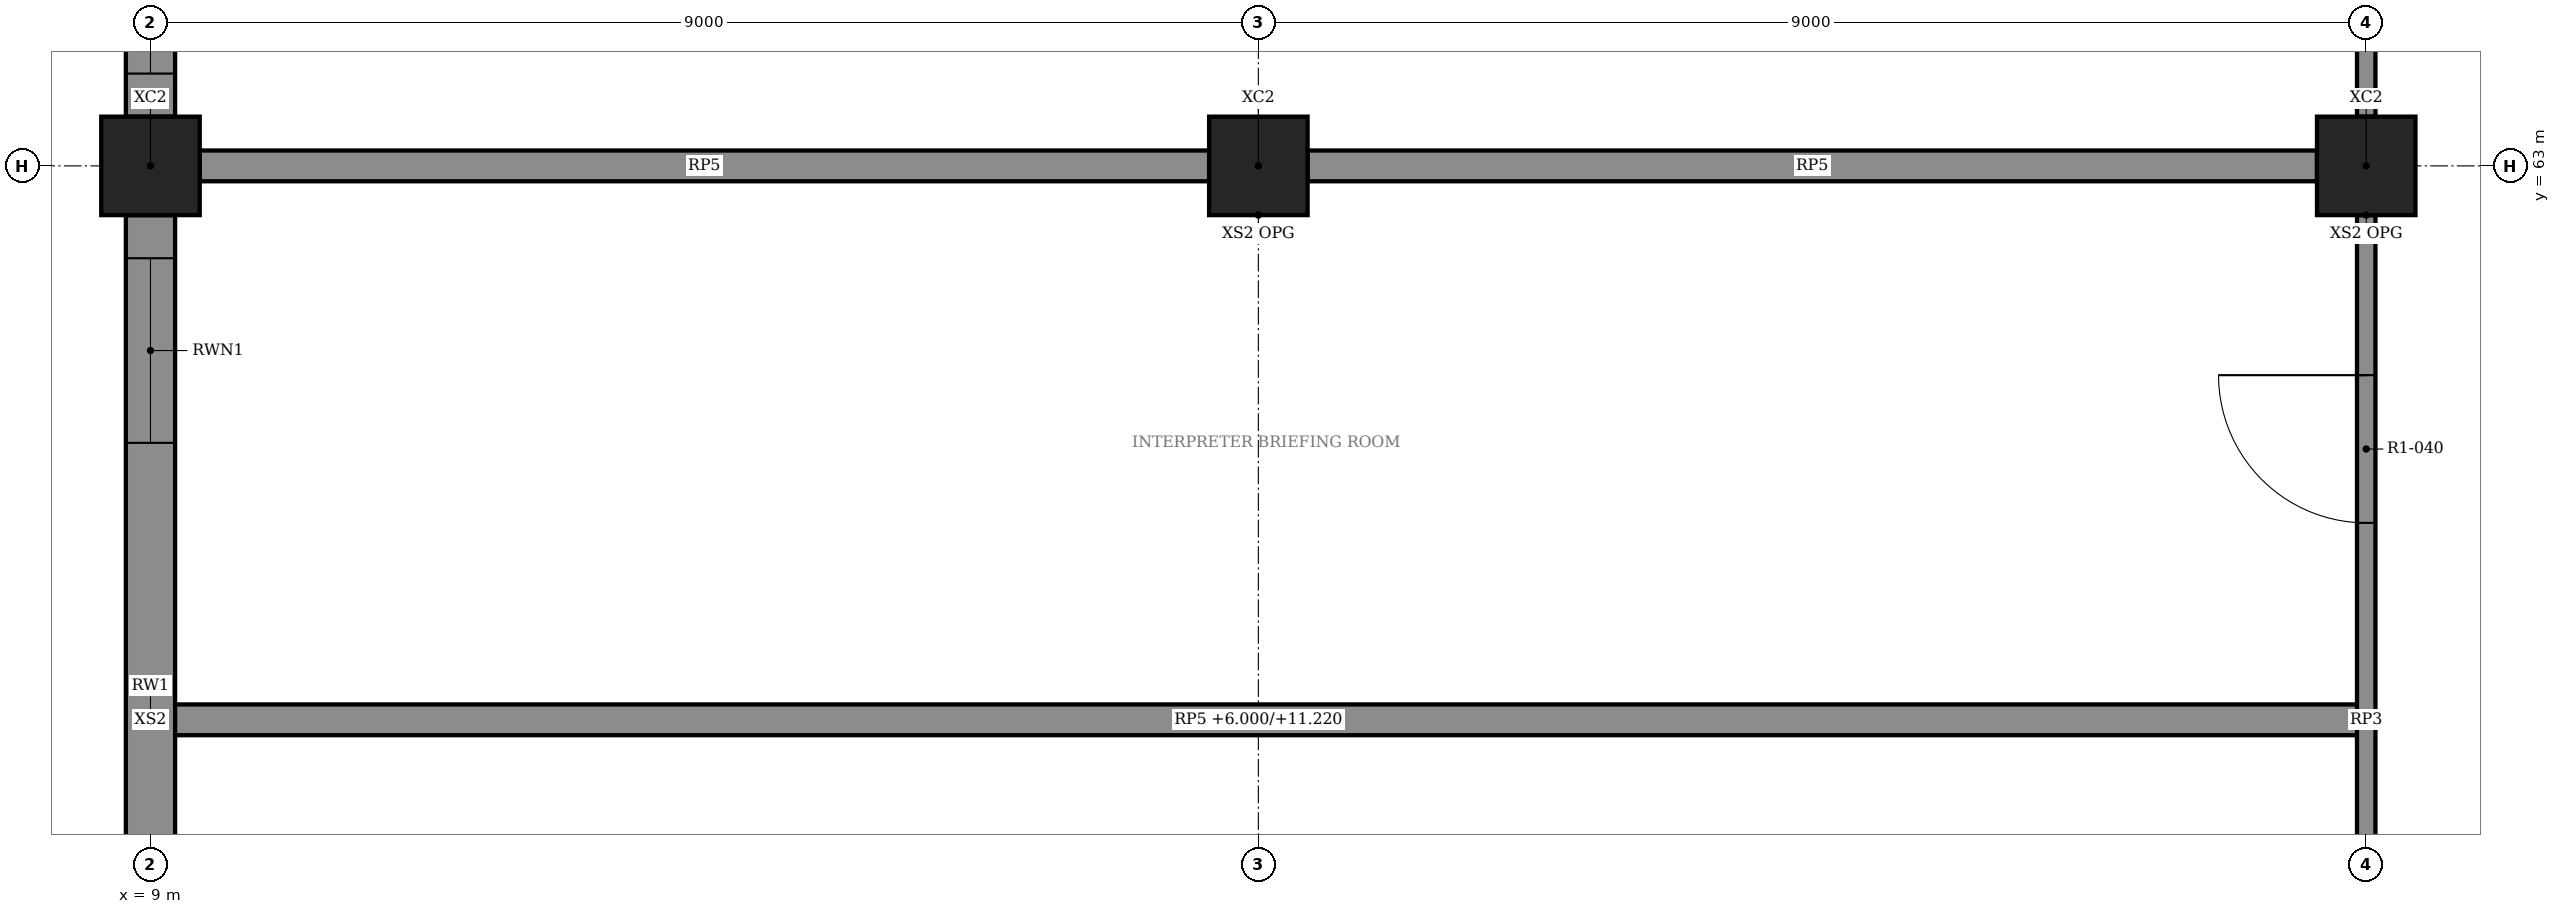
"""IFC4 building model, lengths in metres.
Left out: names, types, materials, properties, quantities, classifications, styles, units other than length and angle.
Written with IfcOpenShell. Run it as: python <this file> out.ifc"""

import sys

from ifc_helpers import new_model, si_unit, direction, frame, frame_2d, origin, origin_2d, place, context, subcontext, project, spatial, rectangle, extrude, element, fill, save


model = new_model("IFC4")
c1 = context("Model", 3, precision=1e-05, world=origin(), true_north=direction((0.0, 1.0)))
c2 = subcontext(c1, "Body", "Model", "MODEL_VIEW")
j1 = project(units=[si_unit("LENGTHUNIT", "METRE"), si_unit("PLANEANGLEUNIT", "RADIAN")], contexts=[c1])
p1 = place(None, origin())
s1 = spatial("IfcSite", under=j1, at=p1, CompositionType="ELEMENT")
p2 = place(p1, origin())
s2 = spatial("IfcBuilding", under=s1, at=p2, CompositionType="ELEMENT")
p3 = place(p2, frame((0.0, 0.0, 6.0)))
s3 = spatial("IfcBuildingStorey", under=s2, at=p3, CompositionType="ELEMENT", Elevation=6.0)
for number, where, z_axis, x_axis in (
    (1, (9.0, 63.0, 0.0), (0.0, 0.0, 1.0), (1.0, 0.0, 0.0)),
    (2, (18.0, 63.0, 0.0), (0.0, 0.0, 1.0), (1.0, 0.0, 0.0)),
    (3, (27.0, 63.0, 0.0), (0.0, 0.0, 1.0), (1.0, 0.0, 0.0)),
):
    element("IfcColumn", number, at=place(p3, frame(where, z_axis=z_axis, x_axis=x_axis)), inside=s3, PredefinedType="COLUMN", context=c2, shape_type="SweptSolid", body=[
        extrude(rectangle(XDim=0.8, YDim=0.8, at=origin_2d()), origin(), (0.0, 0.0, 1.0), 5.5),
    ])
p4 = place(p3, frame((9.0, 54.4, 0.0), z_axis=(0.0, 0.0, 1.0), x_axis=(0.0, 1.0, 0.0)))
e4 = element("IfcWall", 4, at=p4, inside=s3, PredefinedType="SOLIDWALL", context=c2, shape_type="SweptSolid", body=[
    extrude(rectangle(XDim=8.2, YDim=0.4, at=frame_2d((4.1, 0.0))), origin(), (0.0, 0.0, 1.0), 4.32),
])
p5 = place(p4, frame((0.35, 0.0, 0.9)))
e5 = element("IfcOpeningElement", 5, at=p5, cuts=e4, PredefinedType="OPENING", context=c2, shape_type="SweptSolid", body=[
    extrude(rectangle(XDim=1.5, YDim=2.1, at=frame_2d((0.75, 1.05))), frame((0.0, 0.21, 0.0), z_axis=(0.0, -1.0, 0.0), x_axis=(1.0, 0.0, 0.0)), (0.0, 0.0, 1.0), 0.42),
])
p6 = place(p4, frame((6.35, 0.0, 0.9)))
e6 = element("IfcOpeningElement", 6, at=p6, cuts=e4, PredefinedType="OPENING", context=c2, shape_type="SweptSolid", body=[
    extrude(rectangle(XDim=1.5, YDim=2.1, at=frame_2d((0.75, 1.05))), frame((0.0, 0.21, 0.0), z_axis=(0.0, -1.0, 0.0), x_axis=(1.0, 0.0, 0.0)), (0.0, 0.0, 1.0), 0.42),
])
p7 = place(p3, frame((9.0, 63.4, 0.0), z_axis=(0.0, 0.0, 1.0), x_axis=(0.0, 1.0, 0.0)))
e7 = element("IfcWall", 7, at=p7, inside=s3, PredefinedType="SOLIDWALL", context=c2, shape_type="SweptSolid", body=[
    extrude(rectangle(XDim=8.2, YDim=0.4, at=frame_2d((4.1, 0.0))), origin(), (0.0, 0.0, 1.0), 4.32),
])
p8 = place(p7, frame((0.35, 0.0, 0.9)))
e8 = element("IfcOpeningElement", 8, at=p8, cuts=e7, PredefinedType="OPENING", context=c2, shape_type="SweptSolid", body=[
    extrude(rectangle(XDim=1.5, YDim=2.1, at=frame_2d((0.75, 1.05))), frame((0.0, 0.21, 0.0), z_axis=(0.0, -1.0, 0.0), x_axis=(1.0, 0.0, 0.0)), (0.0, 0.0, 1.0), 0.42),
])
p9 = place(p7, frame((3.35, 0.0, 0.9)))
e9 = element("IfcOpeningElement", 9, at=p9, cuts=e7, PredefinedType="OPENING", context=c2, shape_type="SweptSolid", body=[
    extrude(rectangle(XDim=1.5, YDim=2.1, at=frame_2d((0.75, 1.05))), frame((0.0, 0.21, 0.0), z_axis=(0.0, -1.0, 0.0), x_axis=(1.0, 0.0, 0.0)), (0.0, 0.0, 1.0), 0.42),
])
p10 = place(p7, frame((6.35, 0.0, 0.9)))
e10 = element("IfcOpeningElement", 10, at=p10, cuts=e7, PredefinedType="OPENING", context=c2, shape_type="SweptSolid", body=[
    extrude(rectangle(XDim=1.5, YDim=2.1, at=frame_2d((0.75, 1.05))), frame((0.0, 0.21, 0.0), z_axis=(0.0, -1.0, 0.0), x_axis=(1.0, 0.0, 0.0)), (0.0, 0.0, 1.0), 0.42),
])
p11 = place(p3, frame((9.0, 58.5, 0.0), z_axis=(0.0, 0.0, 1.0), x_axis=(1.0, 0.0, 0.0)))
e11 = element("IfcWall", 11, at=p11, inside=s3, PredefinedType="PARTITIONING", context=c2, shape_type="SweptSolid", body=[
    extrude(rectangle(XDim=18.0, YDim=0.25, at=frame_2d((9.0, 0.0))), origin(), (0.0, 0.0, 1.0), 5.22),
])
for number, where, z_axis, x_axis in (
    (12, (9.4, 63.0, 0.0), (0.0, 0.0, 1.0), (1.0, 0.0, 0.0)),
    (13, (18.4, 63.0, 0.0), (0.0, 0.0, 1.0), (1.0, 0.0, 0.0)),
):
    element("IfcWall", number, at=place(p3, frame(where, z_axis=z_axis, x_axis=x_axis)), inside=s3, PredefinedType="PARTITIONING", context=c2, shape_type="SweptSolid", body=[
        extrude(rectangle(XDim=8.2, YDim=0.25, at=frame_2d((4.1, 0.0))), origin(), (0.0, 0.0, 1.0), 4.32),
    ])
p12 = place(p3, frame((27.0, 54.4, 0.0), z_axis=(0.0, 0.0, 1.0), x_axis=(0.0, 1.0, 0.0)))
e14 = element("IfcWall", 14, at=p12, inside=s3, PredefinedType="PARTITIONING", context=c2, shape_type="SweptSolid", body=[
    extrude(rectangle(XDim=8.2, YDim=0.15, at=frame_2d((4.1, 0.0))), origin(), (0.0, 0.0, 1.0), 4.32),
])
p13 = place(p12, frame((1.2, 0.0, 0.0)))
e15 = element("IfcOpeningElement", 15, at=p13, cuts=e14, PredefinedType="OPENING", context=c2, shape_type="SweptSolid", body=[
    extrude(rectangle(XDim=1.2, YDim=2.4, at=frame_2d((0.6, 1.2))), frame((0.0, 0.085, 0.0), z_axis=(0.0, -1.0, 0.0), x_axis=(1.0, 0.0, 0.0)), (0.0, 0.0, 1.0), 0.17),
])
p14 = place(p12, frame((5.7, 0.0, 0.0)))
e16 = element("IfcOpeningElement", 16, at=p14, cuts=e14, PredefinedType="OPENING", context=c2, shape_type="SweptSolid", body=[
    extrude(rectangle(XDim=1.2, YDim=2.4, at=frame_2d((0.6, 1.2))), frame((0.0, 0.085, 0.0), z_axis=(0.0, -1.0, 0.0), x_axis=(1.0, 0.0, 0.0)), (0.0, 0.0, 1.0), 0.17),
])
p15 = place(p3, frame((27.0, 63.4, 0.0), z_axis=(0.0, 0.0, 1.0), x_axis=(0.0, 1.0, 0.0)))
e17 = element("IfcWall", 17, at=p15, inside=s3, PredefinedType="PARTITIONING", context=c2, shape_type="SweptSolid", body=[
    extrude(rectangle(XDim=8.2, YDim=0.15, at=frame_2d((4.1, 0.0))), origin(), (0.0, 0.0, 1.0), 4.32),
])
p16 = place(p15, frame((3.45, 0.0, 0.0)))
e18 = element("IfcOpeningElement", 18, at=p16, cuts=e17, PredefinedType="OPENING", context=c2, shape_type="SweptSolid", body=[
    extrude(rectangle(XDim=1.2, YDim=2.4, at=frame_2d((0.6, 1.2))), frame((0.0, 0.085, 0.0), z_axis=(0.0, -1.0, 0.0), x_axis=(1.0, 0.0, 0.0)), (0.0, 0.0, 1.0), 0.17),
])
p17 = place(p6, origin())
e19 = element("IfcWindow", 19, at=p17, inside=s3, PartitioningType="SINGLE_PANEL", PredefinedType="WINDOW", context=c2, shape_type="SweptSolid", body=[
    extrude(rectangle(XDim=1.5, YDim=2.1, at=frame_2d((0.75, 1.05))), frame((0.0, 0.03, 0.0), z_axis=(0.0, -1.0, 0.0), x_axis=(1.0, 0.0, 0.0)), (0.0, 0.0, 1.0), 0.06),
])
fill(e6, e19)
p18 = place(p8, origin())
e20 = element("IfcWindow", 20, at=p18, inside=s3, PartitioningType="SINGLE_PANEL", PredefinedType="WINDOW", context=c2, shape_type="SweptSolid", body=[
    extrude(rectangle(XDim=1.5, YDim=2.1, at=frame_2d((0.75, 1.05))), frame((0.0, 0.03, 0.0), z_axis=(0.0, -1.0, 0.0), x_axis=(1.0, 0.0, 0.0)), (0.0, 0.0, 1.0), 0.06),
])
fill(e8, e20)
p19 = place(p14, origin())
e21 = element("IfcDoor", 21, at=p19, inside=s3, OperationType="SINGLE_SWING_LEFT", PredefinedType="DOOR", context=c2, shape_type="SweptSolid", body=[
    extrude(rectangle(XDim=1.2, YDim=2.4, at=frame_2d((0.6, 1.2))), frame((0.0, 0.025, 0.0), z_axis=(0.0, -1.0, 0.0), x_axis=(1.0, 0.0, 0.0)), (0.0, 0.0, 1.0), 0.05),
])
fill(e16, e21)
save(model, sys.argv[1])
